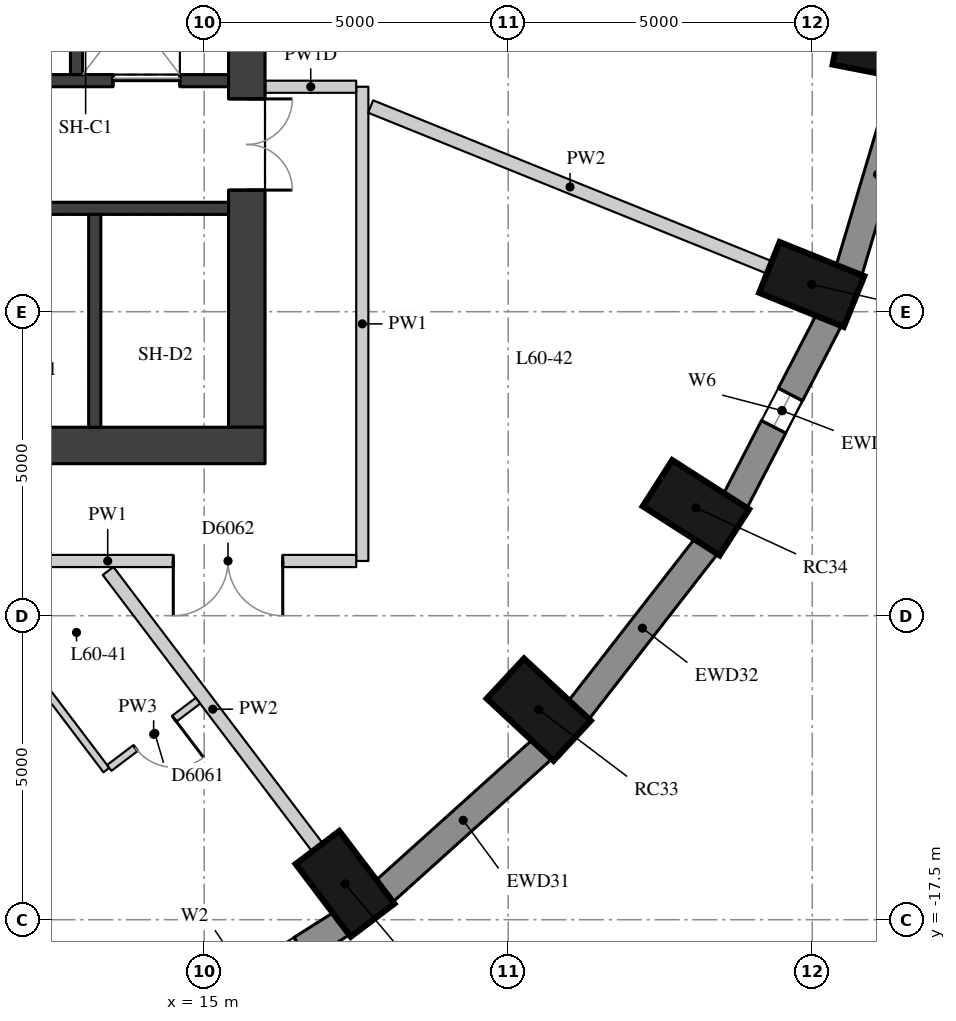
"""IFC4 building model, lengths in metres.
Left out: names, types, materials, properties, quantities, classifications, styles, units other than length and angle.
Written with IfcOpenShell. Run it as: python <this file> out.ifc"""

import sys

from ifc_helpers import new_model, si_unit, direction, frame, frame_2d, origin, origin_2d, place, context, subcontext, project, spatial, rectangle, extrude, element, fill, save


model = new_model("IFC4")
c1 = context("Model", 3, precision=1e-05, world=origin(), true_north=direction((0.0, 1.0)))
c2 = subcontext(c1, "Body", "Model", "MODEL_VIEW")
j1 = project(units=[si_unit("LENGTHUNIT", "METRE"), si_unit("PLANEANGLEUNIT", "RADIAN")], contexts=[c1])
p1 = place(None, origin())
s1 = spatial("IfcSite", under=j1, at=p1, CompositionType="ELEMENT")
p2 = place(p1, origin())
s2 = spatial("IfcBuilding", under=s1, at=p2, CompositionType="ELEMENT")
p3 = place(p2, frame((0.0, 0.0, 212.3)))
s3 = spatial("IfcBuildingStorey", under=s2, at=p3, CompositionType="ELEMENT", Elevation=212.3)
for number, where, z_axis, x_axis in (
    (1, (17.316, -16.911, 0.0), (0.0, 0.0, 1.0), (0.604, -0.797, 0.0)),
    (2, (20.502, -14.045, 0.0), (0.0, 0.0, 1.0), (0.732, -0.681, 0.0)),
    (3, (23.087, -10.725, 0.0), (0.0, 0.0, 1.0), (0.842, -0.539, 0.0)),
    (4, (24.991, -7.052, 0.0), (0.0, 0.0, 1.0), (0.927, -0.374, 0.0)),
    (5, (26.157, -3.137, 0.0), (0.0, 0.0, 1.0), (0.981, -0.192, 0.0)),
):
    element("IfcColumn", number, at=place(p3, frame(where, z_axis=z_axis, x_axis=x_axis)), inside=s3, PredefinedType="COLUMN", context=c2, shape_type="SweptSolid", body=[
        extrude(rectangle(XDim=1.5, YDim=0.9, at=origin_2d()), origin(), (0.0, 0.0, 1.0), 3.3),
    ])
p4 = place(p3, frame((14.232, -19.47, 0.0), z_axis=(0.0, 0.0, 1.0), x_axis=(0.84614984472, 0.532945063098, 0.0)))
e6 = element("IfcWall", 6, at=p4, inside=s3, PredefinedType="SOLIDWALL", context=c2, shape_type="SweptSolid", body=[
    extrude(rectangle(XDim=3.586, YDim=0.45, at=frame_2d((1.793, 0.0))), origin(), (0.0, 0.0, 1.0), 3.02),
])
p5 = place(p4, frame((0.793, 0.0, 0.4)))
e7 = element("IfcOpeningElement", 7, at=p5, cuts=e6, PredefinedType="OPENING", context=c2, shape_type="SweptSolid", body=[
    extrude(rectangle(XDim=2.0, YDim=1.75, at=frame_2d((1.0, 0.875))), frame((0.0, 0.235, 0.0), z_axis=(0.0, -1.0, 0.0), x_axis=(1.0, 0.0, 0.0)), (0.0, 0.0, 1.0), 0.47),
])
p6 = place(p3, frame((17.953, -17.04, 0.0), z_axis=(0.0, 0.0, 1.0), x_axis=(0.743442727602, 0.668799604348, 0.0)))
e8 = element("IfcWall", 8, at=p6, inside=s3, PredefinedType="SOLIDWALL", context=c2, shape_type="SweptSolid", body=[
    extrude(rectangle(XDim=3.513, YDim=0.45, at=frame_2d((1.756, 0.0))), origin(), (0.0, 0.0, 1.0), 3.02),
])
p7 = place(p3, frame((21.151, -14.061, 0.0), z_axis=(0.0, 0.0, 1.0), x_axis=(0.614255239631, 0.789107407509, 0.0)))
e9 = element("IfcWall", 9, at=p7, inside=s3, PredefinedType="SOLIDWALL", context=c2, shape_type="SweptSolid", body=[
    extrude(rectangle(XDim=3.438, YDim=0.45, at=frame_2d((1.719, 0.0))), origin(), (0.0, 0.0, 1.0), 3.02),
])
p8 = place(p3, frame((23.727, -10.624, 0.0), z_axis=(0.0, 0.0, 1.0), x_axis=(0.460175500475, 0.887827972505, 0.0)))
e10 = element("IfcWall", 10, at=p8, inside=s3, PredefinedType="SOLIDWALL", context=c2, shape_type="SweptSolid", body=[
    extrude(rectangle(XDim=3.371, YDim=0.45, at=frame_2d((1.685, 0.0))), origin(), (0.0, 0.0, 1.0), 3.02),
])
p9 = place(p8, frame((1.385, 0.0, 0.4)))
e11 = element("IfcOpeningElement", 11, at=p9, cuts=e10, PredefinedType="OPENING", context=c2, shape_type="SweptSolid", body=[
    extrude(rectangle(XDim=0.6, YDim=1.75, at=frame_2d((0.3, 0.875))), frame((0.0, 0.235, 0.0), z_axis=(0.0, -1.0, 0.0), x_axis=(1.0, 0.0, 0.0)), (0.0, 0.0, 1.0), 0.47),
])
p10 = place(p3, frame((25.6, -6.834, 0.0), z_axis=(0.0, 0.0, 1.0), x_axis=(0.285444972963, 0.958395099847, 0.0)))
e12 = element("IfcWall", 12, at=p10, inside=s3, PredefinedType="SOLIDWALL", context=c2, shape_type="SweptSolid", body=[
    extrude(rectangle(XDim=3.32, YDim=0.45, at=frame_2d((1.66, 0.0))), origin(), (0.0, 0.0, 1.0), 3.02),
])
p11 = place(p3, frame((15.7, -9.4, 0.0), z_axis=(0.0, 0.0, 1.0), x_axis=(0.0, 1.0, 0.0)))
e13 = element("IfcWall", 13, at=p11, inside=s3, PredefinedType="SHEAR", context=c2, shape_type="SweptSolid", body=[
    extrude(rectangle(XDim=18.8, YDim=0.6, at=frame_2d((9.4, 0.0))), origin(), (0.0, 0.0, 1.0), 3.02),
])
p12 = place(p11, frame((13.4, 0.0, 0.0)))
e14 = element("IfcOpeningElement", 14, at=p12, cuts=e13, PredefinedType="OPENING", context=c2, shape_type="SweptSolid", body=[
    extrude(rectangle(XDim=1.5, YDim=2.1, at=frame_2d((0.75, 1.05))), frame((0.0, 0.31, 0.0), z_axis=(0.0, -1.0, 0.0), x_axis=(1.0, 0.0, 0.0)), (0.0, 0.0, 1.0), 0.62),
])
p13 = place(p11, frame((3.9, 0.0, 0.0)))
e15 = element("IfcOpeningElement", 15, at=p13, cuts=e13, PredefinedType="OPENING", context=c2, shape_type="SweptSolid", body=[
    extrude(rectangle(XDim=1.5, YDim=2.1, at=frame_2d((0.75, 1.05))), frame((0.0, 0.31, 0.0), z_axis=(0.0, -1.0, 0.0), x_axis=(1.0, 0.0, 0.0)), (0.0, 0.0, 1.0), 0.62),
])
p14 = place(p3, frame((4.0, -9.7, 0.0), z_axis=(0.0, 0.0, 1.0), x_axis=(1.0, 0.0, 0.0)))
e16 = element("IfcWall", 16, at=p14, inside=s3, PredefinedType="SHEAR", context=c2, shape_type="SweptSolid", body=[
    extrude(rectangle(XDim=12.0, YDim=0.6, at=frame_2d((6.0, 0.0))), origin(), (0.0, 0.0, 1.0), 3.02),
])
p15 = place(p3, frame((4.6, -3.7, 0.0), z_axis=(0.0, 0.0, 1.0), x_axis=(1.0, 0.0, 0.0)))
e17 = element("IfcWall", 17, at=p15, inside=s3, PredefinedType="SHEAR", context=c2, shape_type="SweptSolid", body=[
    extrude(rectangle(XDim=10.8, YDim=0.2, at=frame_2d((5.4, 0.0))), origin(), (0.0, 0.0, 1.0), 3.02),
])
p16 = place(p15, frame((6.6, 0.0, 0.0)))
e18 = element("IfcOpeningElement", 18, at=p16, cuts=e17, PredefinedType="OPENING", context=c2, shape_type="SweptSolid", body=[
    extrude(rectangle(XDim=1.1, YDim=2.1, at=frame_2d((0.55, 1.05))), frame((0.0, 0.11, 0.0), z_axis=(0.0, -1.0, 0.0), x_axis=(1.0, 0.0, 0.0)), (0.0, 0.0, 1.0), 0.22),
])
p17 = place(p15, frame((8.9, 0.0, 0.0)))
e19 = element("IfcOpeningElement", 19, at=p17, cuts=e17, PredefinedType="OPENING", context=c2, shape_type="SweptSolid", body=[
    extrude(rectangle(XDim=1.1, YDim=2.1, at=frame_2d((0.55, 1.05))), frame((0.0, 0.11, 0.0), z_axis=(0.0, -1.0, 0.0), x_axis=(1.0, 0.0, 0.0)), (0.0, 0.0, 1.0), 0.22),
])
p18 = place(p3, frame((4.6, -5.8, 0.0), z_axis=(0.0, 0.0, 1.0), x_axis=(1.0, 0.0, 0.0)))
e20 = element("IfcWall", 20, at=p18, inside=s3, PredefinedType="SHEAR", context=c2, shape_type="SweptSolid", body=[
    extrude(rectangle(XDim=10.8, YDim=0.2, at=frame_2d((5.4, 0.0))), origin(), (0.0, 0.0, 1.0), 3.02),
])
p19 = place(p3, frame((13.2, -9.4, 0.0), z_axis=(0.0, 0.0, 1.0), x_axis=(0.0, 1.0, 0.0)))
e21 = element("IfcWall", 21, at=p19, inside=s3, PredefinedType="SHEAR", context=c2, shape_type="SweptSolid", body=[
    extrude(rectangle(XDim=3.5, YDim=0.2, at=frame_2d((1.75, 0.0))), origin(), (0.0, 0.0, 1.0), 3.02),
])
p20 = place(p3, frame((12.9, -3.6, 0.0), z_axis=(0.0, 0.0, 1.0), x_axis=(0.0, 1.0, 0.0)))
e22 = element("IfcWall", 22, at=p20, inside=s3, PredefinedType="SHEAR", context=c2, shape_type="SweptSolid", body=[
    extrude(rectangle(XDim=2.5, YDim=0.2, at=frame_2d((1.25, 0.0))), origin(), (0.0, 0.0, 1.0), 3.02),
])
p21 = place(p3, frame((17.6, -3.8, 0.0), z_axis=(0.0, 0.0, 1.0), x_axis=(0.0, -1.0, 0.0)))
e23 = element("IfcWall", 23, at=p21, inside=s3, PredefinedType="PARTITIONING", context=c2, shape_type="SweptSolid", body=[
    extrude(rectangle(XDim=7.8, YDim=0.2, at=frame_2d((3.9, 0.0))), origin(), (0.0, 0.0, 1.0), 3.02),
])
p22 = place(p3, frame((17.5, -11.6, 0.0), z_axis=(0.0, 0.0, 1.0), x_axis=(-1.0, 0.0, 0.0)))
e24 = element("IfcWall", 24, at=p22, inside=s3, PredefinedType="PARTITIONING", context=c2, shape_type="SweptSolid", body=[
    extrude(rectangle(XDim=8.174, YDim=0.2, at=frame_2d((4.087, 0.0))), origin(), (0.0, 0.0, 1.0), 3.02),
])
p23 = place(p22, frame((1.208, 0.0, 0.0)))
e25 = element("IfcOpeningElement", 25, at=p23, cuts=e24, PredefinedType="OPENING", context=c2, shape_type="SweptSolid", body=[
    extrude(rectangle(XDim=1.8, YDim=2.1, at=frame_2d((0.9, 1.05))), frame((0.0, 0.11, 0.0), z_axis=(0.0, -1.0, 0.0), x_axis=(1.0, 0.0, 0.0)), (0.0, 0.0, 1.0), 0.22),
])
p24 = place(p3, frame((16.004, -3.8, 0.0), z_axis=(0.0, 0.0, 1.0), x_axis=(1.0, 0.0, 0.0)))
e26 = element("IfcWall", 26, at=p24, inside=s3, PredefinedType="PARTITIONING", context=c2, shape_type="SweptSolid", body=[
    extrude(rectangle(XDim=1.496, YDim=0.2, at=frame_2d((0.748, 0.0))), origin(), (0.0, 0.0, 1.0), 2.47),
])
p25 = place(p3, frame((16.863, -16.312, 0.0), z_axis=(0.0, 0.0, 1.0), x_axis=(-0.603636051313, 0.797260006243, 0.0)))
e27 = element("IfcWall", 27, at=p25, inside=s3, PredefinedType="PARTITIONING", context=c2, shape_type="SweptSolid", body=[
    extrude(rectangle(XDim=5.706, YDim=0.22, at=frame_2d((2.853, 0.0))), origin(), (0.0, 0.0, 1.0), 3.02),
])
p26 = place(p3, frame((24.295, -6.771, 0.0), z_axis=(0.0, 0.0, 1.0), x_axis=(-0.927375021142, 0.374133091509, 0.0)))
e28 = element("IfcWall", 28, at=p26, inside=s3, PredefinedType="PARTITIONING", context=c2, shape_type="SweptSolid", body=[
    extrude(rectangle(XDim=7.072, YDim=0.22, at=frame_2d((3.536, 0.0))), origin(), (0.0, 0.0, 1.0), 3.02),
])
p27 = place(p3, frame((10.887, -11.732, 0.0), z_axis=(0.0, 0.0, 1.0), x_axis=(0.603646932038, -0.797251767913, 0.0)))
e29 = element("IfcWall", 29, at=p27, inside=s3, PredefinedType="PARTITIONING", context=c2, shape_type="SweptSolid", body=[
    extrude(rectangle(XDim=4.149, YDim=0.12, at=frame_2d((2.074, 0.0))), origin(), (0.0, 0.0, 1.0), 3.02),
])
p28 = place(p3, frame((13.439, -15.003, 0.0), z_axis=(0.0, 0.0, 1.0), x_axis=(0.797238062708, 0.603665032422, 0.0)))
e30 = element("IfcWall", 30, at=p28, inside=s3, PredefinedType="PARTITIONING", context=c2, shape_type="SweptSolid", body=[
    extrude(rectangle(XDim=1.83, YDim=0.12, at=frame_2d((0.915, 0.0))), origin(), (0.0, 0.0, 1.0), 3.02),
])
p29 = place(p28, frame((0.54, 0.0, 0.0)))
e31 = element("IfcOpeningElement", 31, at=p29, cuts=e30, PredefinedType="OPENING", context=c2, shape_type="SweptSolid", body=[
    extrude(rectangle(XDim=0.8, YDim=2.1, at=frame_2d((0.4, 1.05))), frame((0.0, 0.07, 0.0), z_axis=(0.0, -1.0, 0.0), x_axis=(1.0, 0.0, 0.0)), (0.0, 0.0, 1.0), 0.14),
])
p30 = place(p9, origin())
e32 = element("IfcWindow", 32, at=p30, inside=s3, PartitioningType="SINGLE_PANEL", PredefinedType="WINDOW", context=c2, shape_type="SweptSolid", body=[
    extrude(rectangle(XDim=0.6, YDim=1.75, at=frame_2d((0.3, 0.875))), frame((0.0, 0.035, 0.0), z_axis=(0.0, -1.0, 0.0), x_axis=(1.0, 0.0, 0.0)), (0.0, 0.0, 1.0), 0.06),
])
fill(e11, e32)
p31 = place(p13, origin())
e33 = element("IfcDoor", 33, at=p31, inside=s3, OperationType="DOUBLE_DOOR_SINGLE_SWING", PredefinedType="DOOR", context=c2, shape_type="SweptSolid", body=[
    extrude(rectangle(XDim=1.5, YDim=2.1, at=frame_2d((0.75, 1.05))), frame((0.0, 0.025, 0.0), z_axis=(0.0, -1.0, 0.0), x_axis=(1.0, 0.0, 0.0)), (0.0, 0.0, 1.0), 0.05),
])
fill(e15, e33)
p32 = place(p17, origin())
e34 = element("IfcDoor", 34, at=p32, inside=s3, OperationType="DOUBLE_DOOR_SLIDING", PredefinedType="DOOR", context=c2, shape_type="SweptSolid", body=[
    extrude(rectangle(XDim=1.1, YDim=2.1, at=frame_2d((0.55, 1.05))), frame((0.0, 0.025, 0.0), z_axis=(0.0, -1.0, 0.0), x_axis=(1.0, 0.0, 0.0)), (0.0, 0.0, 1.0), 0.05),
])
fill(e19, e34)
p33 = place(p29, origin())
e35 = element("IfcDoor", 35, at=p33, inside=s3, OperationType="SINGLE_SWING_LEFT", PredefinedType="DOOR", context=c2, shape_type="SweptSolid", body=[
    extrude(rectangle(XDim=0.8, YDim=2.1, at=frame_2d((0.4, 1.05))), frame((0.0, 0.025, 0.0), z_axis=(0.0, -1.0, 0.0), x_axis=(1.0, 0.0, 0.0)), (0.0, 0.0, 1.0), 0.05),
])
fill(e31, e35)
p34 = place(p23, origin())
e36 = element("IfcDoor", 36, at=p34, inside=s3, OperationType="DOUBLE_DOOR_SINGLE_SWING", PredefinedType="DOOR", context=c2, shape_type="SweptSolid", body=[
    extrude(rectangle(XDim=1.8, YDim=2.1, at=frame_2d((0.9, 1.05))), frame((0.0, 0.025, 0.0), z_axis=(0.0, -1.0, 0.0), x_axis=(1.0, 0.0, 0.0)), (0.0, 0.0, 1.0), 0.05),
])
fill(e25, e36)
save(model, sys.argv[1])
